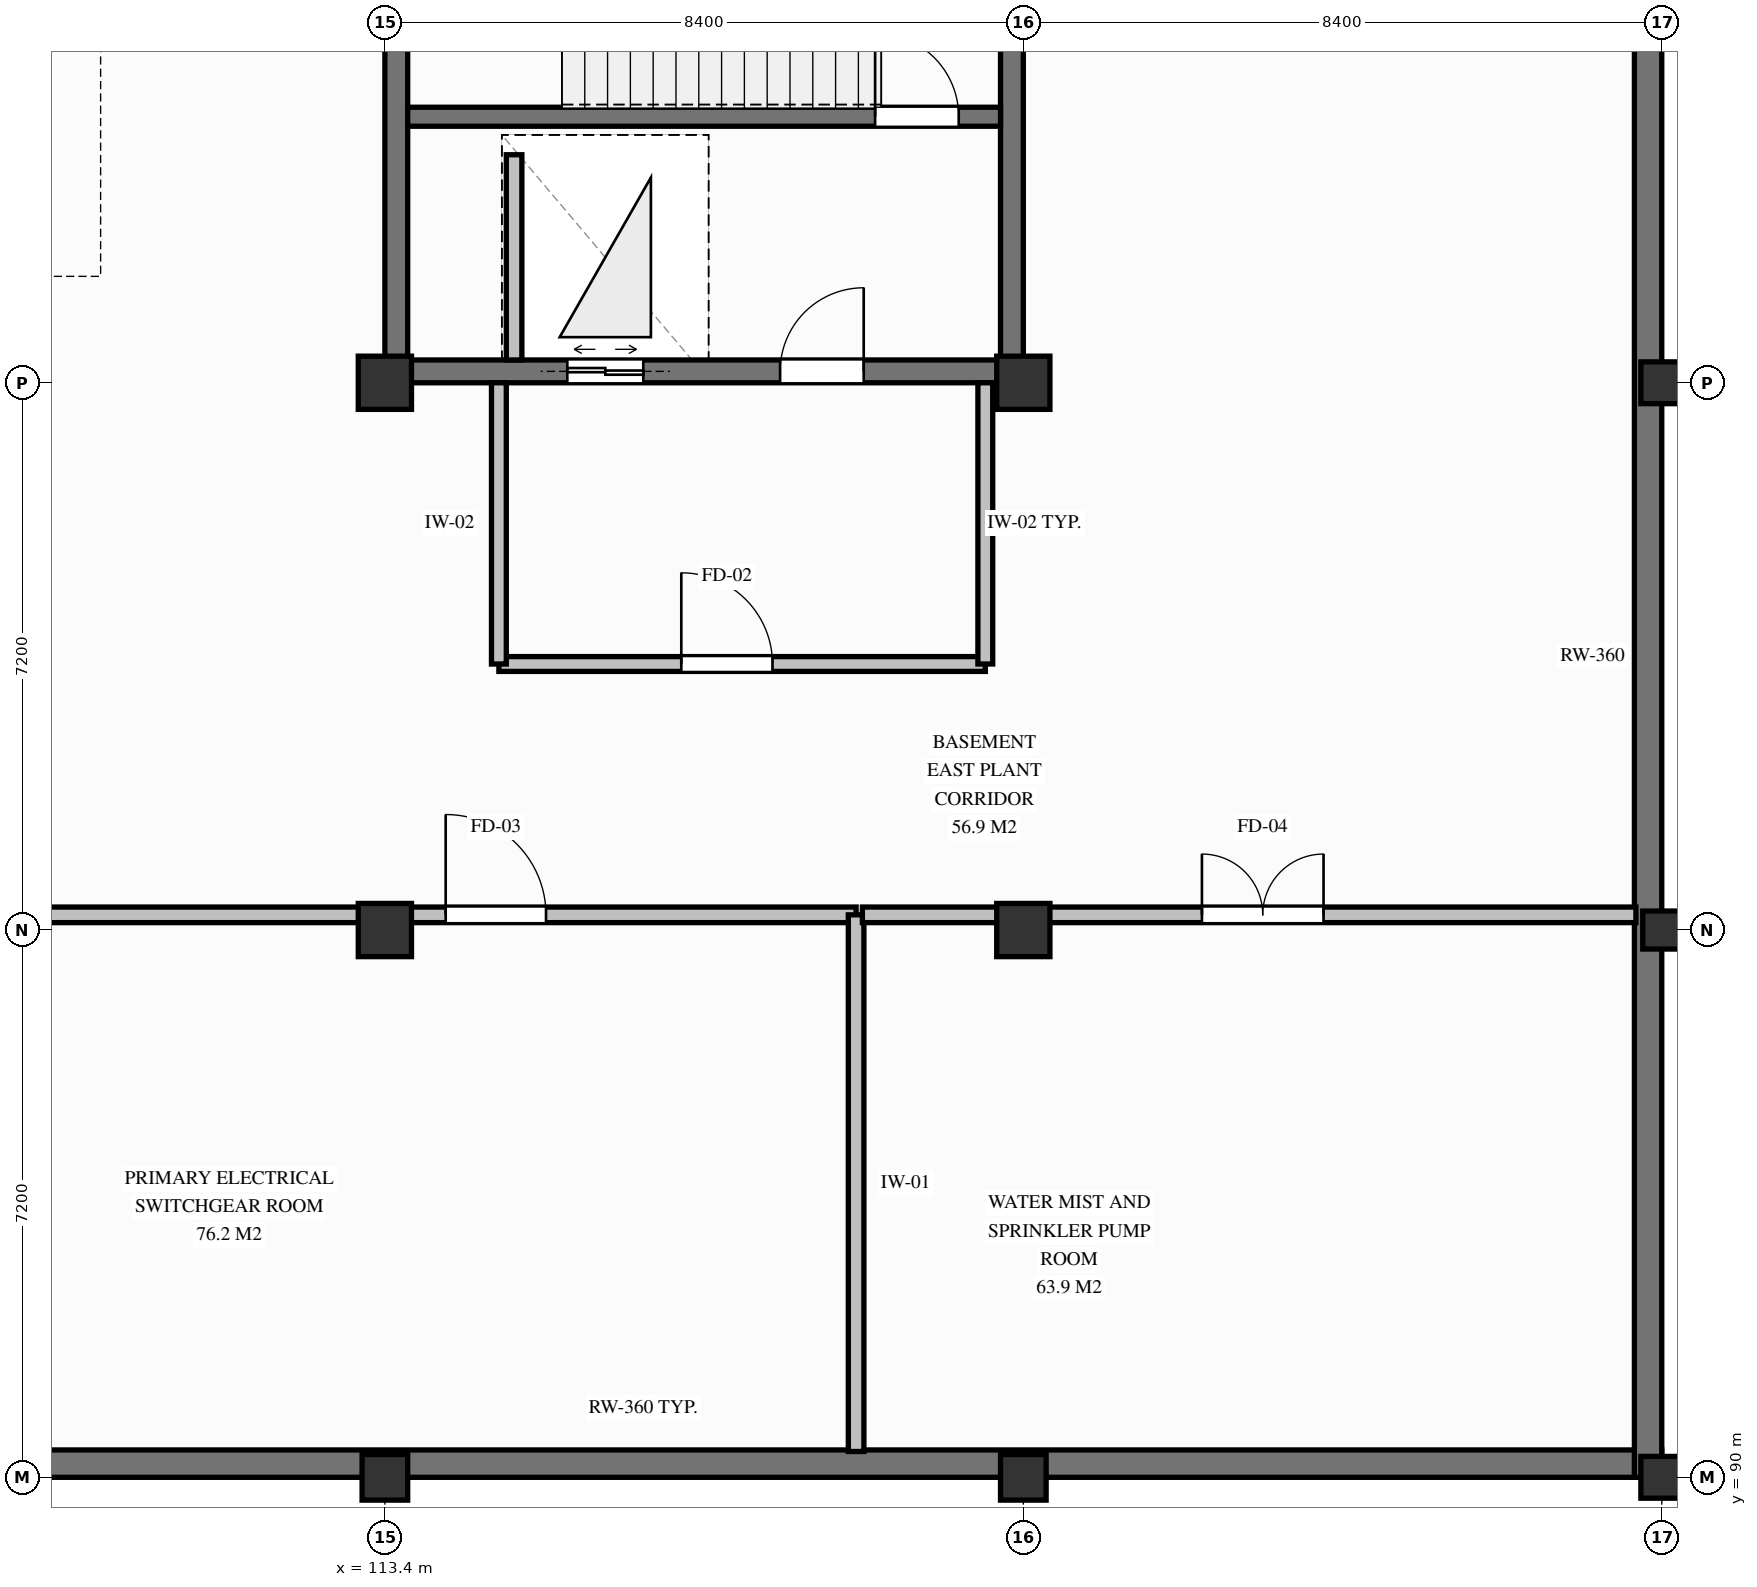
"""IFC4 building model, lengths in metres.
Left out: names, types, materials, properties, quantities, classifications, styles, units other than length and angle.
Written with IfcOpenShell. Run it as: python <this file> out.ifc"""

import sys

from ifc_helpers import new_model, si_unit, direction, frame, frame_2d, origin, origin_2d, place, context, subcontext, project, spatial, rectangle, extrude, element, fill, save


model = new_model("IFC4")
c1 = context("Model", 3, precision=1e-05, world=origin(), true_north=direction((0.0, 1.0)))
c2 = subcontext(c1, "Body", "Model", "MODEL_VIEW")
j1 = project(units=[si_unit("LENGTHUNIT", "METRE"), si_unit("PLANEANGLEUNIT", "RADIAN")], contexts=[c1])
p1 = place(None, origin())
s1 = spatial("IfcSite", under=j1, at=p1, CompositionType="ELEMENT")
p2 = place(p1, origin())
s2 = spatial("IfcBuilding", under=s1, at=p2, CompositionType="ELEMENT")
p3 = place(p2, frame((0.0, 0.0, -4.5)))
s3 = spatial("IfcBuildingStorey", under=s2, at=p3, CompositionType="ELEMENT", Elevation=-4.5)
p4 = place(p3, frame((113.4, 104.55, 0.0), z_axis=(0.0, 0.0, 1.0), x_axis=(1.0, 0.0, 0.0)))
e1 = element("IfcWall", 1, at=p4, inside=s3, PredefinedType="SHEAR", context=c2, shape_type="SweptSolid", body=[
    extrude(rectangle(XDim=8.4, YDim=0.3, at=frame_2d((4.2, 0.0))), origin(), (0.0, 0.0, 1.0), 4.5),
])
p5 = place(p4, frame((5.2, 0.0, 0.0)))
e2 = element("IfcOpeningElement", 2, at=p5, cuts=e1, PredefinedType="OPENING", context=c2, shape_type="SweptSolid", body=[
    extrude(rectangle(XDim=1.1, YDim=2.15, at=frame_2d((0.55, 1.075))), frame((0.0, 0.16, 0.0), z_axis=(0.0, -1.0, 0.0), x_axis=(1.0, 0.0, 0.0)), (0.0, 0.0, 1.0), 0.32),
])
p6 = place(p4, frame((2.4, 0.0, 0.0)))
e3 = element("IfcOpeningElement", 3, at=p6, cuts=e1, PredefinedType="OPENING", context=c2, shape_type="SweptSolid", body=[
    extrude(rectangle(XDim=1.0, YDim=2.1, at=frame_2d((0.5, 1.05))), frame((0.0, 0.16, 0.0), z_axis=(0.0, -1.0, 0.0), x_axis=(1.0, 0.0, 0.0)), (0.0, 0.0, 1.0), 0.32),
])
for number, where, z_axis, x_axis in (
    (4, (113.55, 104.4, 0.0), (0.0, 0.0, 1.0), (0.0, 1.0, 0.0)),
    (5, (121.65, 111.6, 0.0), (0.0, 0.0, 1.0), (0.0, -1.0, 0.0)),
):
    element("IfcWall", number, at=place(p3, frame(where, z_axis=z_axis, x_axis=x_axis)), inside=s3, PredefinedType="SHEAR", context=c2, shape_type="SweptSolid", body=[
        extrude(rectangle(XDim=7.2, YDim=0.3, at=frame_2d((3.6, 0.0))), origin(), (0.0, 0.0, 1.0), 4.5),
    ])
p7 = place(p3, frame((113.7, 107.9, 0.0), z_axis=(0.0, 0.0, 1.0), x_axis=(1.0, 0.0, 0.0)))
e6 = element("IfcWall", 6, at=p7, inside=s3, PredefinedType="SHEAR", context=c2, shape_type="SweptSolid", body=[
    extrude(rectangle(XDim=7.8, YDim=0.25, at=frame_2d((3.9, 0.0))), origin(), (0.0, 0.0, 1.0), 4.5),
])
p8 = place(p7, frame((6.15, 0.0, 0.0)))
e7 = element("IfcOpeningElement", 7, at=p8, cuts=e6, PredefinedType="OPENING", context=c2, shape_type="SweptSolid", body=[
    extrude(rectangle(XDim=1.1, YDim=2.15, at=frame_2d((0.55, 1.075))), frame((0.0, 0.135, 0.0), z_axis=(0.0, -1.0, 0.0), x_axis=(1.0, 0.0, 0.0)), (0.0, 0.0, 1.0), 0.27),
])
p9 = place(p3, frame((98.0, 90.18, 0.0), z_axis=(0.0, 0.0, 1.0), x_axis=(1.0, 0.0, 0.0)))
e8 = element("IfcWall", 8, at=p9, inside=s3, PredefinedType="USERDEFINED", context=c2, shape_type="SweptSolid", body=[
    extrude(rectangle(XDim=32.2, YDim=0.36, at=frame_2d((16.1, 0.0))), origin(), (0.0, 0.0, 1.0), 4.5),
])
p10 = place(p3, frame((130.02, 90.0, 0.0), z_axis=(0.0, 0.0, 1.0), x_axis=(0.0, 1.0, 0.0)))
e9 = element("IfcWall", 9, at=p10, inside=s3, PredefinedType="USERDEFINED", context=c2, shape_type="SweptSolid", body=[
    extrude(rectangle(XDim=21.6, YDim=0.36, at=frame_2d((10.8, 0.0))), origin(), (0.0, 0.0, 1.0), 4.5),
])
p11 = place(p3, frame((113.4, 90.0, 0.0), z_axis=(0.0, 0.0, 1.0), x_axis=(1.0, 0.0, 0.0)))
e10 = element("IfcColumn", 10, at=p11, inside=s3, PredefinedType="COLUMN", context=c2, shape_type="SweptSolid", body=[
    extrude(rectangle(XDim=0.6, YDim=0.6, at=origin_2d()), origin(), (0.0, 0.0, 1.0), 4.5),
])
for number, where, z_axis, x_axis in (
    (11, (113.4, 97.2, 0.0), (0.0, 0.0, 1.0), (1.0, 0.0, 0.0)),
    (12, (113.4, 104.4, 0.0), (0.0, 0.0, 1.0), (1.0, 0.0, 0.0)),
):
    element("IfcColumn", number, at=place(p3, frame(where, z_axis=z_axis, x_axis=x_axis)), inside=s3, PredefinedType="COLUMN", context=c2, shape_type="SweptSolid", body=[
        extrude(rectangle(XDim=0.7, YDim=0.7, at=origin_2d()), origin(), (0.0, 0.0, 1.0), 4.5),
    ])
p12 = place(p3, frame((121.8, 90.0, 0.0), z_axis=(0.0, 0.0, 1.0), x_axis=(1.0, 0.0, 0.0)))
e13 = element("IfcColumn", 13, at=p12, inside=s3, PredefinedType="COLUMN", context=c2, shape_type="SweptSolid", body=[
    extrude(rectangle(XDim=0.6, YDim=0.6, at=origin_2d()), origin(), (0.0, 0.0, 1.0), 4.5),
])
for number, where, z_axis, x_axis in (
    (14, (121.8, 97.2, 0.0), (0.0, 0.0, 1.0), (1.0, 0.0, 0.0)),
    (15, (121.8, 104.4, 0.0), (0.0, 0.0, 1.0), (1.0, 0.0, 0.0)),
):
    element("IfcColumn", number, at=place(p3, frame(where, z_axis=z_axis, x_axis=x_axis)), inside=s3, PredefinedType="COLUMN", context=c2, shape_type="SweptSolid", body=[
        extrude(rectangle(XDim=0.7, YDim=0.7, at=origin_2d()), origin(), (0.0, 0.0, 1.0), 4.5),
    ])
p13 = place(p3, frame((130.2, 90.0, 0.0), z_axis=(0.0, 0.0, 1.0), x_axis=(1.0, 0.0, 0.0)))
e16 = element("IfcColumn", 16, at=p13, inside=s3, PredefinedType="COLUMN", context=c2, shape_type="SweptSolid", body=[
    extrude(rectangle(XDim=0.55, YDim=0.55, at=origin_2d()), origin(), (0.0, 0.0, 1.0), 4.5),
])
p14 = place(p3, frame((130.2, 97.2, 0.0), z_axis=(0.0, 0.0, 1.0), x_axis=(1.0, 0.0, 0.0)))
e17 = element("IfcColumn", 17, at=p14, inside=s3, PredefinedType="COLUMN", context=c2, shape_type="SweptSolid", body=[
    extrude(rectangle(XDim=0.5, YDim=0.5, at=origin_2d()), origin(), (0.0, 0.0, 1.0), 4.5),
])
p15 = place(p3, frame((130.2, 104.4, 0.0), z_axis=(0.0, 0.0, 1.0), x_axis=(1.0, 0.0, 0.0)))
e18 = element("IfcColumn", 18, at=p15, inside=s3, PredefinedType="COLUMN", context=c2, shape_type="SweptSolid", body=[
    extrude(rectangle(XDim=0.55, YDim=0.55, at=origin_2d()), origin(), (0.0, 0.0, 1.0), 4.5),
])
p16 = place(p3, frame((115.1, 104.7, 0.0), z_axis=(0.0, 0.0, 1.0), x_axis=(0.0, 1.0, 0.0)))
e19 = element("IfcWall", 19, at=p16, inside=s3, PredefinedType="PARTITIONING", context=c2, shape_type="SweptSolid", body=[
    extrude(rectangle(XDim=2.7, YDim=0.205, at=frame_2d((1.35, 0.0))), origin(), (0.0, 0.0, 1.0), 3.613),
])
p17 = place(p3, frame((114.9, 100.7, 0.0), z_axis=(0.0, 0.0, 1.0), x_axis=(1.0, 0.0, 0.0)))
e20 = element("IfcWall", 20, at=p17, inside=s3, PredefinedType="PARTITIONING", context=c2, shape_type="SweptSolid", body=[
    extrude(rectangle(XDim=6.4, YDim=0.195, at=frame_2d((3.2, 0.0))), origin(), (0.0, 0.0, 1.0), 4.23),
])
p18 = place(p17, frame((2.4, 0.0, 0.0)))
e21 = element("IfcOpeningElement", 21, at=p18, cuts=e20, PredefinedType="OPENING", context=c2, shape_type="SweptSolid", body=[
    extrude(rectangle(XDim=1.2, YDim=2.15, at=frame_2d((0.6, 1.075))), frame((0.0, 0.107, 0.0), z_axis=(0.0, -1.0, 0.0), x_axis=(1.0, 0.0, 0.0)), (0.0, 0.0, 1.0), 0.215),
])
for number, where, z_axis, x_axis in (
    (22, (121.3, 100.7, 0.0), (0.0, 0.0, 1.0), (0.0, 1.0, 0.0)),
    (23, (114.9, 100.7, 0.0), (0.0, 0.0, 1.0), (0.0, 1.0, 0.0)),
):
    element("IfcWall", number, at=place(p3, frame(where, z_axis=z_axis, x_axis=x_axis)), inside=s3, PredefinedType="PARTITIONING", context=c2, shape_type="SweptSolid", body=[
        extrude(rectangle(XDim=3.7, YDim=0.195, at=frame_2d((1.85, 0.0))), origin(), (0.0, 0.0, 1.0), 3.613),
    ])
p19 = place(p3, frame((108.083, 97.4, 0.0), z_axis=(0.0, 0.0, 1.0), x_axis=(1.0, 0.0, 0.0)))
e24 = element("IfcWall", 24, at=p19, inside=s3, PredefinedType="PARTITIONING", context=c2, shape_type="SweptSolid", body=[
    extrude(rectangle(XDim=11.518, YDim=0.205, at=frame_2d((5.759, 0.0))), origin(), (0.0, 0.0, 1.0), 3.413),
])
p20 = place(p19, frame((6.117, 0.0, 0.0)))
e25 = element("IfcOpeningElement", 25, at=p20, cuts=e24, PredefinedType="OPENING", context=c2, shape_type="SweptSolid", body=[
    extrude(rectangle(XDim=1.32, YDim=2.18, at=frame_2d((0.66, 1.09))), frame((0.0, 0.113, 0.0), z_axis=(0.0, -1.0, 0.0), x_axis=(1.0, 0.0, 0.0)), (0.0, 0.0, 1.0), 0.225),
])
p21 = place(p3, frame((119.6, 97.4, 0.0), z_axis=(0.0, 0.0, 1.0), x_axis=(0.0, -1.0, 0.0)))
e26 = element("IfcWall", 26, at=p21, inside=s3, PredefinedType="PARTITIONING", context=c2, shape_type="SweptSolid", body=[
    extrude(rectangle(XDim=7.06, YDim=0.205, at=frame_2d((3.53, 0.0))), origin(), (0.0, 0.0, 1.0), 3.613),
])
p22 = place(p3, frame((119.683, 97.4, 0.0), z_axis=(0.0, 0.0, 1.0), x_axis=(1.0, 0.0, 0.0)))
e27 = element("IfcWall", 27, at=p22, inside=s3, PredefinedType="PARTITIONING", context=c2, shape_type="SweptSolid", body=[
    extrude(rectangle(XDim=10.177, YDim=0.205, at=frame_2d((5.089, 0.0))), origin(), (0.0, 0.0, 1.0), 3.313),
])
p23 = place(p22, frame((4.468, 0.0, 0.0)))
e28 = element("IfcOpeningElement", 28, at=p23, cuts=e27, PredefinedType="OPENING", context=c2, shape_type="SweptSolid", body=[
    extrude(rectangle(XDim=1.6, YDim=2.2, at=frame_2d((0.8, 1.1))), frame((0.0, 0.113, 0.0), z_axis=(0.0, -1.0, 0.0), x_axis=(1.0, 0.0, 0.0)), (0.0, 0.0, 1.0), 0.225),
])
p24 = place(p8, origin())
e29 = element("IfcDoor", 29, at=p24, inside=s3, OperationType="SINGLE_SWING_LEFT", PredefinedType="DOOR", context=c2, shape_type="SweptSolid", body=[
    extrude(rectangle(XDim=1.1, YDim=2.15, at=frame_2d((0.55, 1.075))), frame((0.0, 0.025, 0.0), z_axis=(0.0, -1.0, 0.0), x_axis=(1.0, 0.0, 0.0)), (0.0, 0.0, 1.0), 0.05),
])
fill(e7, e29)
p25 = place(p5, origin())
e30 = element("IfcDoor", 30, at=p25, inside=s3, OperationType="SINGLE_SWING_RIGHT", PredefinedType="DOOR", context=c2, shape_type="SweptSolid", body=[
    extrude(rectangle(XDim=1.1, YDim=2.15, at=frame_2d((0.55, 1.075))), frame((0.0, 0.025, 0.0), z_axis=(0.0, -1.0, 0.0), x_axis=(1.0, 0.0, 0.0)), (0.0, 0.0, 1.0), 0.05),
])
fill(e2, e30)
p26 = place(p6, origin())
e31 = element("IfcDoor", 31, at=p26, inside=s3, OperationType="DOUBLE_DOOR_SLIDING", PredefinedType="DOOR", context=c2, shape_type="SweptSolid", body=[
    extrude(rectangle(XDim=1.0, YDim=2.1, at=frame_2d((0.5, 1.05))), frame((0.0, 0.025, 0.0), z_axis=(0.0, -1.0, 0.0), x_axis=(1.0, 0.0, 0.0)), (0.0, 0.0, 1.0), 0.05),
])
fill(e3, e31)
p27 = place(p18, origin())
e32 = element("IfcDoor", 32, at=p27, inside=s3, OperationType="SINGLE_SWING_LEFT", PredefinedType="DOOR", context=c2, shape_type="SweptSolid", body=[
    extrude(rectangle(XDim=1.2, YDim=2.15, at=frame_2d((0.6, 1.075))), frame((0.0, 0.025, 0.0), z_axis=(0.0, -1.0, 0.0), x_axis=(1.0, 0.0, 0.0)), (0.0, 0.0, 1.0), 0.05),
])
fill(e21, e32)
p28 = place(p20, origin())
e33 = element("IfcDoor", 33, at=p28, inside=s3, OperationType="SINGLE_SWING_LEFT", PredefinedType="DOOR", context=c2, shape_type="SweptSolid", body=[
    extrude(rectangle(XDim=1.32, YDim=2.18, at=frame_2d((0.66, 1.09))), frame((0.0, 0.025, 0.0), z_axis=(0.0, -1.0, 0.0), x_axis=(1.0, 0.0, 0.0)), (0.0, 0.0, 1.0), 0.05),
])
fill(e25, e33)
p29 = place(p23, origin())
e34 = element("IfcDoor", 34, at=p29, inside=s3, OperationType="DOUBLE_DOOR_SINGLE_SWING", PredefinedType="DOOR", context=c2, shape_type="SweptSolid", body=[
    extrude(rectangle(XDim=1.6, YDim=2.2, at=frame_2d((0.8, 1.1))), frame((0.0, 0.025, 0.0), z_axis=(0.0, -1.0, 0.0), x_axis=(1.0, 0.0, 0.0)), (0.0, 0.0, 1.0), 0.05),
])
fill(e28, e34)
save(model, sys.argv[1])
